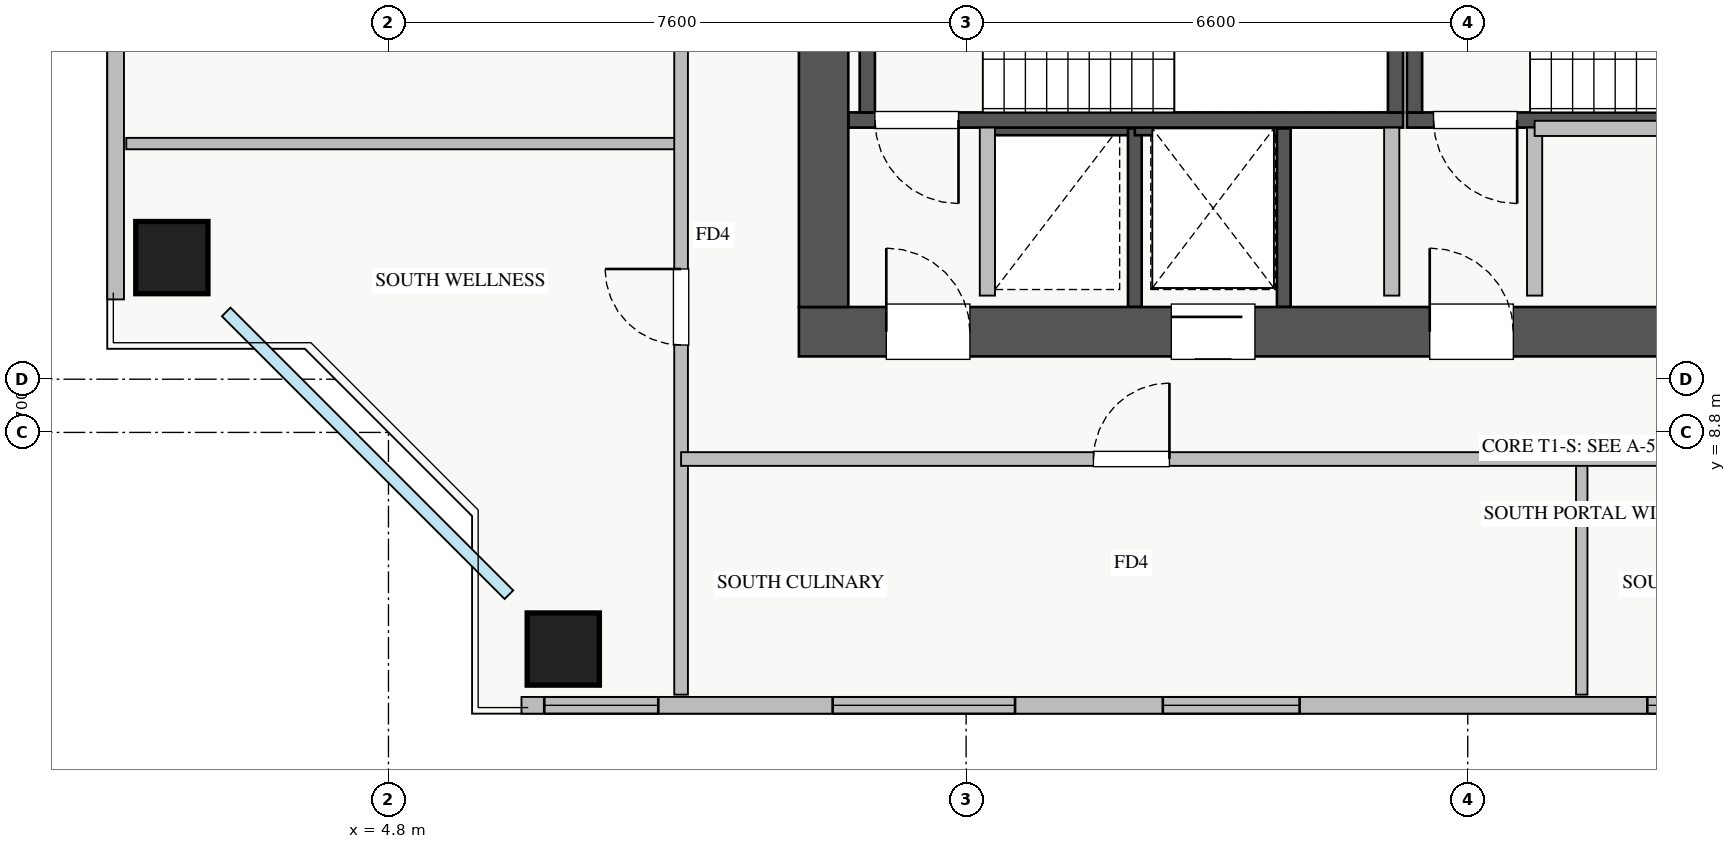
"""IFC4 building model, lengths in metres.
Left out: names, types, materials, properties, quantities, classifications, styles, units other than length and angle.
Written with IfcOpenShell. Run it as: python <this file> out.ifc"""

import sys

from ifc_helpers import new_model, si_unit, direction, frame, frame_2d, origin, origin_2d, place, context, subcontext, project, spatial, rectangle, extrude, source, transform, mapped, element, fill, save


model = new_model("IFC4")
c1 = context("Model", 3, precision=1e-05, world=origin(), true_north=direction((0.0, 1.0)))
c2 = subcontext(c1, "Body", "Model", "MODEL_VIEW")
j1 = project(units=[si_unit("LENGTHUNIT", "METRE"), si_unit("PLANEANGLEUNIT", "RADIAN")], contexts=[c1])
p1 = place(None, origin())
s1 = spatial("IfcSite", under=j1, at=p1, CompositionType="ELEMENT")
p2 = place(p1, origin())
s2 = spatial("IfcBuilding", under=s1, at=p2, CompositionType="ELEMENT")
p3 = place(p2, frame((0.0, 0.0, 166.5)))
s3 = spatial("IfcBuildingStorey", under=s2, at=p3, CompositionType="ELEMENT", Elevation=166.5)
p4 = place(p3, frame((12.68, 12.8, 0.0), z_axis=(0.0, 0.0, 1.0), x_axis=(1.0, 0.0, 0.0)))
e1 = element("IfcWall", 1, at=p4, inside=s3, PredefinedType="SHEAR", context=c2, shape_type="SweptSolid", body=[
    extrude(rectangle(XDim=1.94, YDim=0.18, at=frame_2d((0.97, 0.0))), origin(), (0.0, 0.0, 1.0), 3.07),
])
p5 = place(p3, frame((14.62, 10.45, 0.0), z_axis=(0.0, 0.0, 1.0), x_axis=(0.0, 1.0, 0.0)))
e2 = element("IfcWall", 2, at=p5, inside=s3, PredefinedType="SHEAR", context=c2, shape_type="SweptSolid", body=[
    extrude(rectangle(XDim=2.35, YDim=0.18, at=frame_2d((1.175, 0.0))), origin(), (0.0, 0.0, 1.0), 3.07),
])
p6 = place(p3, frame((14.62, 12.8, 0.0), z_axis=(0.0, 0.0, 1.0), x_axis=(1.0, 0.0, 0.0)))
e3 = element("IfcWall", 3, at=p6, inside=s3, PredefinedType="SHEAR", context=c2, shape_type="SweptSolid", body=[
    extrude(rectangle(XDim=1.96, YDim=0.18, at=frame_2d((0.98, 0.0))), origin(), (0.0, 0.0, 1.0), 3.07),
])
p7 = place(p3, frame((16.58, 10.45, 0.0), z_axis=(0.0, 0.0, 1.0), x_axis=(0.0, 1.0, 0.0)))
e4 = element("IfcWall", 4, at=p7, inside=s3, PredefinedType="SHEAR", context=c2, shape_type="SweptSolid", body=[
    extrude(rectangle(XDim=2.35, YDim=0.18, at=frame_2d((1.175, 0.0))), origin(), (0.0, 0.0, 1.0), 3.07),
])
p8 = place(p3, frame((10.85, 12.91, 0.0), z_axis=(0.0, 0.0, 1.0), x_axis=(1.0, 0.0, 0.0)))
e5 = element("IfcWall", 5, at=p8, inside=s3, PredefinedType="SHEAR", context=c2, shape_type="SweptSolid", body=[
    extrude(rectangle(XDim=7.3, YDim=0.2, at=frame_2d((3.65, 0.0))), origin(), (0.0, 0.0, 1.0), 3.25),
])
p9 = place(p8, frame((0.35, 0.0, 0.0)))
e6 = element("IfcOpeningElement", 6, at=p9, cuts=e5, PredefinedType="OPENING", context=c2, shape_type="SweptSolid", body=[
    extrude(rectangle(XDim=1.1, YDim=2.05, at=frame_2d((0.55, 1.025))), frame((0.0, 0.11, 0.0), z_axis=(0.0, -1.0, 0.0), x_axis=(1.0, 0.0, 0.0)), (0.0, 0.0, 1.0), 0.22),
])
for number, where, z_axis, x_axis in (
    (7, (11.1, 13.01, 0.0), (0.0, 0.0, 1.0), (0.0, 1.0, 0.0)),
    (8, (18.05, 13.01, 0.0), (0.0, 0.0, 1.0), (0.0, 1.0, 0.0)),
):
    element("IfcWall", number, at=place(p3, frame(where, z_axis=z_axis, x_axis=x_axis)), inside=s3, PredefinedType="SHEAR", context=c2, shape_type="SweptSolid", body=[
        extrude(rectangle(XDim=2.94, YDim=0.2, at=frame_2d((1.47, 0.0))), origin(), (0.0, 0.0, 1.0), 3.25),
    ])
p10 = place(p3, frame((18.2, 12.91, 0.0), z_axis=(0.0, 0.0, 1.0), x_axis=(1.0, 0.0, 0.0)))
e9 = element("IfcWall", 9, at=p10, inside=s3, PredefinedType="SHEAR", context=c2, shape_type="SweptSolid", body=[
    extrude(rectangle(XDim=7.15, YDim=0.2, at=frame_2d((3.575, 0.0))), origin(), (0.0, 0.0, 1.0), 3.25),
])
p11 = place(p10, frame((0.35, 0.0, 0.0)))
e10 = element("IfcOpeningElement", 10, at=p11, cuts=e9, PredefinedType="OPENING", context=c2, shape_type="SweptSolid", body=[
    extrude(rectangle(XDim=1.1, YDim=2.05, at=frame_2d((0.55, 1.025))), frame((0.0, 0.11, 0.0), z_axis=(0.0, -1.0, 0.0), x_axis=(1.0, 0.0, 0.0)), (0.0, 0.0, 1.0), 0.22),
])
p12 = place(p3, frame((18.3, 13.01, 0.0), z_axis=(0.0, 0.0, 1.0), x_axis=(0.0, 1.0, 0.0)))
e11 = element("IfcWall", 11, at=p12, inside=s3, PredefinedType="SHEAR", context=c2, shape_type="SweptSolid", body=[
    extrude(rectangle(XDim=2.94, YDim=0.2, at=frame_2d((1.47, 0.0))), origin(), (0.0, 0.0, 1.0), 3.25),
])
p13 = place(p3, frame((10.2, 10.125, 0.0), z_axis=(0.0, 0.0, 1.0), x_axis=(1.0, 0.0, 0.0)))
e12 = element("IfcWall", 12, at=p13, inside=s3, PredefinedType="SHEAR", context=c2, shape_type="SweptSolid", body=[
    extrude(rectangle(XDim=17.6, YDim=0.65, at=frame_2d((8.8, 0.0))), origin(), (0.0, 0.0, 1.0), 3.25),
])
p14 = place(p13, frame((1.15, 0.0, 0.0)))
e13 = element("IfcOpeningElement", 13, at=p14, cuts=e12, PredefinedType="OPENING", context=c2, shape_type="SweptSolid", body=[
    extrude(rectangle(XDim=1.1, YDim=2.05, at=frame_2d((0.55, 1.025))), frame((0.0, 0.335, 0.0), z_axis=(0.0, -1.0, 0.0), x_axis=(1.0, 0.0, 0.0)), (0.0, 0.0, 1.0), 0.67),
])
p15 = place(p13, frame((8.3, 0.0, 0.0)))
e14 = element("IfcOpeningElement", 14, at=p15, cuts=e12, PredefinedType="OPENING", context=c2, shape_type="SweptSolid", body=[
    extrude(rectangle(XDim=1.1, YDim=2.05, at=frame_2d((0.55, 1.025))), frame((0.0, 0.335, 0.0), z_axis=(0.0, -1.0, 0.0), x_axis=(1.0, 0.0, 0.0)), (0.0, 0.0, 1.0), 0.67),
])
p16 = place(p13, frame((4.9, 0.0, 0.0)))
e15 = element("IfcOpeningElement", 15, at=p16, cuts=e12, PredefinedType="OPENING", context=c2, shape_type="SweptSolid", body=[
    extrude(rectangle(XDim=1.1, YDim=2.05, at=frame_2d((0.55, 1.025))), frame((0.0, 0.335, 0.0), z_axis=(0.0, -1.0, 0.0), x_axis=(1.0, 0.0, 0.0)), (0.0, 0.0, 1.0), 0.67),
])
p17 = place(p13, frame((14.74, 0.0, 0.0)))
e16 = element("IfcOpeningElement", 16, at=p17, cuts=e12, PredefinedType="OPENING", context=c2, shape_type="SweptSolid", body=[
    extrude(rectangle(XDim=1.0, YDim=2.05, at=frame_2d((0.5, 1.025))), frame((0.0, 0.335, 0.0), z_axis=(0.0, -1.0, 0.0), x_axis=(1.0, 0.0, 0.0)), (0.0, 0.0, 1.0), 0.67),
])
p18 = place(p13, frame((11.67, 0.0, 0.0)))
e17 = element("IfcOpeningElement", 17, at=p18, cuts=e12, PredefinedType="OPENING", context=c2, shape_type="SweptSolid", body=[
    extrude(rectangle(XDim=1.0, YDim=2.05, at=frame_2d((0.5, 1.025))), frame((0.0, 0.335, 0.0), z_axis=(0.0, -1.0, 0.0), x_axis=(1.0, 0.0, 0.0)), (0.0, 0.0, 1.0), 0.67),
])
p19 = place(p3, frame((10.525, 10.45, 0.0), z_axis=(0.0, 0.0, 1.0), x_axis=(0.0, 1.0, 0.0)))
e18 = element("IfcWall", 18, at=p19, inside=s3, PredefinedType="SHEAR", context=c2, shape_type="SweptSolid", body=[
    extrude(rectangle(XDim=5.9, YDim=0.65, at=frame_2d((2.95, 0.0))), origin(), (0.0, 0.0, 1.0), 3.25),
])
m1 = source(origin(), c2, "Body", "SweptSolid", [
    extrude(rectangle(XDim=0.95, YDim=0.95, at=origin_2d()), origin(), (0.0, 0.0, 1.0), 3.25),
])
for number, where, z_axis, x_axis in (
    (19, (7.1, 5.95, 0.0), (0.0, 0.0, 1.0), (1.0, 0.0, 0.0)),
    (20, (1.95, 11.1, 0.0), (0.0, 0.0, 1.0), (1.0, 0.0, 0.0)),
):
    element("IfcColumn", number, at=place(p3, frame(where, z_axis=z_axis, x_axis=x_axis)), inside=s3, PredefinedType="COLUMN", context=c2, shape_type="MappedRepresentation", body=[
        mapped(m1, transform((0.0, 0.0, 0.0), x_axis=(1.0, 0.0, 0.0), y_axis=(0.0, 1.0, 0.0), z_axis=(0.0, 0.0, 1.0), scale=1.0)),
    ])
p20 = place(p3, frame((1.21, 10.55, 0.0), z_axis=(0.0, 0.0, 1.0), x_axis=(0.0, 1.0, 0.0)))
e21 = element("IfcWall", 21, at=p20, inside=s3, PredefinedType="STANDARD", context=c2, shape_type="SweptSolid", body=[
    extrude(rectangle(XDim=6.3, YDim=0.22, at=frame_2d((3.15, 0.0))), origin(), (0.0, 0.0, 1.0), 2.61),
])
p21 = place(p3, frame((6.55, 5.21, 0.0), z_axis=(0.0, 0.0, 1.0), x_axis=(1.0, 0.0, 0.0)))
e22 = element("IfcWall", 22, at=p21, inside=s3, PredefinedType="STANDARD", context=c2, shape_type="SweptSolid", body=[
    extrude(rectangle(XDim=24.9, YDim=0.22, at=frame_2d((12.45, 0.0))), origin(), (0.0, 0.0, 1.0), 2.61),
])
p22 = place(p21, frame((0.3, 0.0, 0.9)))
e23 = element("IfcOpeningElement", 23, at=p22, cuts=e22, PredefinedType="OPENING", context=c2, shape_type="SweptSolid", body=[
    extrude(rectangle(XDim=1.5, YDim=1.5, at=frame_2d((0.75, 0.75))), frame((0.0, 0.12, 0.0), z_axis=(0.0, -1.0, 0.0), x_axis=(1.0, 0.0, 0.0)), (0.0, 0.0, 1.0), 0.24),
])
p23 = place(p21, frame((8.438, 0.0, 0.9)))
e24 = element("IfcOpeningElement", 24, at=p23, cuts=e22, PredefinedType="OPENING", context=c2, shape_type="SweptSolid", body=[
    extrude(rectangle(XDim=1.8, YDim=1.45, at=frame_2d((0.9, 0.725))), frame((0.0, 0.12, 0.0), z_axis=(0.0, -1.0, 0.0), x_axis=(1.0, 0.0, 0.0)), (0.0, 0.0, 1.0), 0.24),
])
p24 = place(p21, frame((14.813, 0.0, 0.9)))
e25 = element("IfcOpeningElement", 25, at=p24, cuts=e22, PredefinedType="OPENING", context=c2, shape_type="SweptSolid", body=[
    extrude(rectangle(XDim=1.5, YDim=1.45, at=frame_2d((0.75, 0.725))), frame((0.0, 0.12, 0.0), z_axis=(0.0, -1.0, 0.0), x_axis=(1.0, 0.0, 0.0)), (0.0, 0.0, 1.0), 0.24),
])
p25 = place(p21, frame((20.738, 0.0, 0.9)))
e26 = element("IfcOpeningElement", 26, at=p25, cuts=e22, PredefinedType="OPENING", context=c2, shape_type="SweptSolid", body=[
    extrude(rectangle(XDim=2.1, YDim=1.48, at=frame_2d((1.05, 0.74))), frame((0.0, 0.12, 0.0), z_axis=(0.0, -1.0, 0.0), x_axis=(1.0, 0.0, 0.0)), (0.0, 0.0, 1.0), 0.24),
])
p26 = place(p21, frame((4.094, 0.0, 0.9)))
e27 = element("IfcOpeningElement", 27, at=p26, cuts=e22, PredefinedType="OPENING", context=c2, shape_type="SweptSolid", body=[
    extrude(rectangle(XDim=2.4, YDim=1.5, at=frame_2d((1.2, 0.75))), frame((0.0, 0.12, 0.0), z_axis=(0.0, -1.0, 0.0), x_axis=(1.0, 0.0, 0.0)), (0.0, 0.0, 1.0), 0.24),
])
for number, where, z_axis, x_axis in (
    (28, (12.68, 10.6, 0.0), (0.0, 0.0, 1.0), (0.0, 1.0, 0.0)),
    (29, (18.0, 10.6, 0.0), (0.0, 0.0, 1.0), (0.0, 1.0, 0.0)),
    (30, (19.88, 10.6, 0.0), (0.0, 0.0, 1.0), (0.0, 1.0, 0.0)),
):
    element("IfcWall", number, at=place(p3, frame(where, z_axis=z_axis, x_axis=x_axis)), inside=s3, PredefinedType="PARTITIONING", context=c2, shape_type="SweptSolid", body=[
        extrude(rectangle(XDim=2.21, YDim=0.2, at=frame_2d((1.105, 0.0))), origin(), (0.0, 0.0, 1.0), 3.07),
    ])
p27 = place(p3, frame((19.88, 12.8, 0.0), z_axis=(0.0, 0.0, 1.0), x_axis=(1.0, 0.0, 0.0)))
e31 = element("IfcWall", 31, at=p27, inside=s3, PredefinedType="PARTITIONING", context=c2, shape_type="SweptSolid", body=[
    extrude(rectangle(XDim=1.87, YDim=0.2, at=frame_2d((0.935, 0.0))), origin(), (0.0, 0.0, 1.0), 3.07),
])
p28 = place(p3, frame((1.35, 12.6, 0.0), z_axis=(0.0, 0.0, 1.0), x_axis=(1.0, 0.0, 0.0)))
e32 = element("IfcWall", 32, at=p28, inside=s3, PredefinedType="PARTITIONING", context=c2, shape_type="SweptSolid", body=[
    extrude(rectangle(XDim=7.3, YDim=0.15, at=frame_2d((3.65, 0.0))), origin(), (0.0, 0.0, 1.0), 3.07),
])
p29 = place(p3, frame((8.65, 5.35, 0.0), z_axis=(0.0, 0.0, 1.0), x_axis=(0.0, 1.0, 0.0)))
e33 = element("IfcWall", 33, at=p29, inside=s3, PredefinedType="PARTITIONING", context=c2, shape_type="SweptSolid", body=[
    extrude(rectangle(XDim=11.35, YDim=0.18, at=frame_2d((5.675, 0.0))), origin(), (0.0, 0.0, 1.0), 3.07),
])
p30 = place(p29, frame((4.6, 0.0, 0.0)))
e34 = element("IfcOpeningElement", 34, at=p30, cuts=e33, PredefinedType="OPENING", context=c2, shape_type="SweptSolid", body=[
    extrude(rectangle(XDim=1.0, YDim=2.05, at=frame_2d((0.5, 1.025))), frame((0.0, 0.1, 0.0), z_axis=(0.0, -1.0, 0.0), x_axis=(1.0, 0.0, 0.0)), (0.0, 0.0, 1.0), 0.2),
])
p31 = place(p29, frame((8.8, 0.0, 0.0)))
e35 = element("IfcOpeningElement", 35, at=p31, cuts=e33, PredefinedType="OPENING", context=c2, shape_type="SweptSolid", body=[
    extrude(rectangle(XDim=1.0, YDim=2.05, at=frame_2d((0.5, 1.025))), frame((0.0, 0.1, 0.0), z_axis=(0.0, -1.0, 0.0), x_axis=(1.0, 0.0, 0.0)), (0.0, 0.0, 1.0), 0.2),
])
p32 = place(p3, frame((20.5, 5.35, 0.0), z_axis=(0.0, 0.0, 1.0), x_axis=(0.0, 1.0, 0.0)))
e36 = element("IfcWall", 36, at=p32, inside=s3, PredefinedType="PARTITIONING", context=c2, shape_type="SweptSolid", body=[
    extrude(rectangle(XDim=3.1, YDim=0.15, at=frame_2d((1.55, 0.0))), origin(), (0.0, 0.0, 1.0), 3.07),
])
p33 = place(p3, frame((8.65, 8.45, 0.0), z_axis=(0.0, 0.0, 1.0), x_axis=(1.0, 0.0, 0.0)))
e37 = element("IfcWall", 37, at=p33, inside=s3, PredefinedType="PARTITIONING", context=c2, shape_type="SweptSolid", body=[
    extrude(rectangle(XDim=23.8, YDim=0.18, at=frame_2d((11.9, 0.0))), origin(), (0.0, 0.0, 1.0), 3.07),
])
p34 = place(p33, frame((5.425, 0.0, 0.0)))
e38 = element("IfcOpeningElement", 38, at=p34, cuts=e37, PredefinedType="OPENING", context=c2, shape_type="SweptSolid", body=[
    extrude(rectangle(XDim=1.0, YDim=2.05, at=frame_2d((0.5, 1.025))), frame((0.0, 0.1, 0.0), z_axis=(0.0, -1.0, 0.0), x_axis=(1.0, 0.0, 0.0)), (0.0, 0.0, 1.0), 0.2),
])
p35 = place(p33, frame((17.325, 0.0, 0.0)))
e39 = element("IfcOpeningElement", 39, at=p35, cuts=e37, PredefinedType="OPENING", context=c2, shape_type="SweptSolid", body=[
    extrude(rectangle(XDim=1.0, YDim=2.05, at=frame_2d((0.5, 1.025))), frame((0.0, 0.1, 0.0), z_axis=(0.0, -1.0, 0.0), x_axis=(1.0, 0.0, 0.0)), (0.0, 0.0, 1.0), 0.2),
])
m2 = source(origin(), c2, "Body", "SweptSolid", [
    extrude(rectangle(XDim=1.5, YDim=1.5, at=frame_2d((0.75, 0.75))), frame((0.0, 0.03, 0.0), z_axis=(0.0, -1.0, 0.0), x_axis=(1.0, 0.0, 0.0)), (0.0, 0.0, 1.0), 0.06),
])
p36 = place(p22, origin())
e40 = element("IfcWindow", 40, at=p36, inside=s3, PartitioningType="TRIPLE_PANEL_VERTICAL", PredefinedType="WINDOW", context=c2, shape_type="MappedRepresentation", body=[
    mapped(m2, transform((0.0, 0.0, 0.0), x_axis=(1.0, 0.0, 0.0), y_axis=(0.0, 1.0, 0.0), z_axis=(0.0, 0.0, 1.0), scale=1.0)),
])
fill(e23, e40)
m3 = source(origin(), c2, "Body", "SweptSolid", [
    extrude(rectangle(XDim=1.8, YDim=1.45, at=frame_2d((0.9, 0.725))), frame((0.0, 0.03, 0.0), z_axis=(0.0, -1.0, 0.0), x_axis=(1.0, 0.0, 0.0)), (0.0, 0.0, 1.0), 0.06),
])
p37 = place(p23, origin())
e41 = element("IfcWindow", 41, at=p37, inside=s3, PartitioningType="DOUBLE_PANEL_VERTICAL", PredefinedType="WINDOW", context=c2, shape_type="MappedRepresentation", body=[
    mapped(m3, transform((0.0, 0.0, 0.0), x_axis=(1.0, 0.0, 0.0), y_axis=(0.0, 1.0, 0.0), z_axis=(0.0, 0.0, 1.0), scale=1.0)),
])
fill(e24, e41)
m4 = source(origin(), c2, "Body", "SweptSolid", [
    extrude(rectangle(XDim=1.5, YDim=1.45, at=frame_2d((0.75, 0.725))), frame((0.0, 0.03, 0.0), z_axis=(0.0, -1.0, 0.0), x_axis=(1.0, 0.0, 0.0)), (0.0, 0.0, 1.0), 0.06),
])
p38 = place(p24, origin())
e42 = element("IfcWindow", 42, at=p38, inside=s3, PartitioningType="DOUBLE_PANEL_VERTICAL", PredefinedType="WINDOW", context=c2, shape_type="MappedRepresentation", body=[
    mapped(m4, transform((0.0, 0.0, 0.0), x_axis=(1.0, 0.0, 0.0), y_axis=(0.0, 1.0, 0.0), z_axis=(0.0, 0.0, 1.0), scale=1.0)),
])
fill(e25, e42)
m5 = source(origin(), c2, "Body", "SweptSolid", [
    extrude(rectangle(XDim=1.1, YDim=2.05, at=frame_2d((0.55, 1.025))), frame((0.0, 0.025, 0.0), z_axis=(0.0, -1.0, 0.0), x_axis=(1.0, 0.0, 0.0)), (0.0, 0.0, 1.0), 0.05),
])
p39 = place(p14, origin())
e43 = element("IfcDoor", 43, at=p39, inside=s3, OperationType="SINGLE_SWING_LEFT", PredefinedType="DOOR", context=c2, shape_type="MappedRepresentation", body=[
    mapped(m5, transform((0.0, 0.0, 0.0), x_axis=(1.0, 0.0, 0.0), y_axis=(0.0, 1.0, 0.0), z_axis=(0.0, 0.0, 1.0), scale=1.0)),
])
fill(e13, e43)
p40 = place(p9, frame((1.1, 0.0, 0.0), z_axis=(0.0, 0.0, 1.0), x_axis=(-1.0, 0.0, 0.0)))
e44 = element("IfcDoor", 44, at=p40, inside=s3, OperationType="SINGLE_SWING_RIGHT", PredefinedType="DOOR", context=c2, shape_type="MappedRepresentation", body=[
    mapped(m5, transform((0.0, 0.0, 0.0), x_axis=(1.0, 0.0, 0.0), y_axis=(0.0, 1.0, 0.0), z_axis=(0.0, 0.0, 1.0), scale=1.0)),
])
fill(e6, e44)
p41 = place(p15, origin())
e45 = element("IfcDoor", 45, at=p41, inside=s3, OperationType="SINGLE_SWING_LEFT", PredefinedType="DOOR", context=c2, shape_type="MappedRepresentation", body=[
    mapped(m5, transform((0.0, 0.0, 0.0), x_axis=(1.0, 0.0, 0.0), y_axis=(0.0, 1.0, 0.0), z_axis=(0.0, 0.0, 1.0), scale=1.0)),
])
fill(e14, e45)
p42 = place(p11, frame((1.1, 0.0, 0.0), z_axis=(0.0, 0.0, 1.0), x_axis=(-1.0, 0.0, 0.0)))
e46 = element("IfcDoor", 46, at=p42, inside=s3, OperationType="SINGLE_SWING_RIGHT", PredefinedType="DOOR", context=c2, shape_type="MappedRepresentation", body=[
    mapped(m5, transform((0.0, 0.0, 0.0), x_axis=(1.0, 0.0, 0.0), y_axis=(0.0, 1.0, 0.0), z_axis=(0.0, 0.0, 1.0), scale=1.0)),
])
fill(e10, e46)
p43 = place(p16, origin())
e47 = element("IfcDoor", 47, at=p43, inside=s3, OperationType="SLIDING_TO_RIGHT", PredefinedType="DOOR", context=c2, shape_type="MappedRepresentation", body=[
    mapped(m5, transform((0.0, 0.0, 0.0), x_axis=(1.0, 0.0, 0.0), y_axis=(0.0, 1.0, 0.0), z_axis=(0.0, 0.0, 1.0), scale=1.0)),
])
fill(e15, e47)
m6 = source(origin(), c2, "Body", "SweptSolid", [
    extrude(rectangle(XDim=1.0, YDim=2.05, at=frame_2d((0.5, 1.025))), frame((0.0, 0.025, 0.0), z_axis=(0.0, -1.0, 0.0), x_axis=(1.0, 0.0, 0.0)), (0.0, 0.0, 1.0), 0.05),
])
p44 = place(p30, origin())
e48 = element("IfcDoor", 48, at=p44, inside=s3, OperationType="SINGLE_SWING_RIGHT", PredefinedType="DOOR", context=c2, shape_type="MappedRepresentation", body=[
    mapped(m6, transform((0.0, 0.0, 0.0), x_axis=(1.0, 0.0, 0.0), y_axis=(0.0, 1.0, 0.0), z_axis=(0.0, 0.0, 1.0), scale=1.0)),
])
fill(e34, e48)
p45 = place(p34, origin())
e49 = element("IfcDoor", 49, at=p45, inside=s3, OperationType="SINGLE_SWING_RIGHT", PredefinedType="DOOR", context=c2, shape_type="MappedRepresentation", body=[
    mapped(m6, transform((0.0, 0.0, 0.0), x_axis=(1.0, 0.0, 0.0), y_axis=(0.0, 1.0, 0.0), z_axis=(0.0, 0.0, 1.0), scale=1.0)),
])
fill(e38, e49)
m7 = source(origin(), c2, "Body", "SweptSolid", [
    extrude(rectangle(XDim=2.4, YDim=1.5, at=frame_2d((1.2, 0.75))), frame((0.0, 0.03, 0.0), z_axis=(0.0, -1.0, 0.0), x_axis=(1.0, 0.0, 0.0)), (0.0, 0.0, 1.0), 0.06),
])
p46 = place(p26, origin())
e50 = element("IfcWindow", 50, at=p46, inside=s3, PartitioningType="TRIPLE_PANEL_VERTICAL", PredefinedType="WINDOW", context=c2, shape_type="MappedRepresentation", body=[
    mapped(m7, transform((0.0, 0.0, 0.0), x_axis=(1.0, 0.0, 0.0), y_axis=(0.0, 1.0, 0.0), z_axis=(0.0, 0.0, 1.0), scale=1.0)),
])
fill(e27, e50)
save(model, sys.argv[1])
